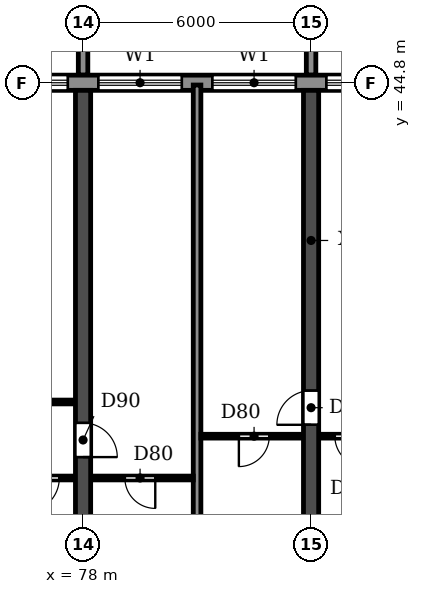
"""IFC4 building model, lengths in metres.
Left out: names, types, materials, properties, quantities, classifications, styles, units other than length and angle.
Written with IfcOpenShell. Run it as: python <this file> out.ifc"""

import sys

from ifc_helpers import new_model, si_unit, direction, frame, frame_2d, origin, place, context, subcontext, project, spatial, polyline, rectangle, outline, extrude, source, transform, mapped, element, fill, save


model = new_model("IFC4")
c1 = context("Model", 3, precision=1e-05, world=origin(), true_north=direction((0.0, 1.0)))
c2 = subcontext(c1, "Body", "Model", "MODEL_VIEW")
j1 = project(units=[si_unit("LENGTHUNIT", "METRE"), si_unit("PLANEANGLEUNIT", "RADIAN")], contexts=[c1])
p1 = place(None, origin())
s1 = spatial("IfcSite", under=j1, at=p1, CompositionType="ELEMENT")
p2 = place(p1, origin())
s2 = spatial("IfcBuilding", under=s1, at=p2, CompositionType="ELEMENT")
p3 = place(p2, frame((0.0, 0.0, 49.8)))
s3 = spatial("IfcBuildingStorey", under=s2, at=p3, CompositionType="ELEMENT", Elevation=49.8)
p4 = place(p3, frame((78.0, 30.55, 0.0), z_axis=(0.0, 0.0, 1.0), x_axis=(0.0, 1.0, 0.0)))
e1 = element("IfcWall", 1, at=p4, inside=s3, PredefinedType="SHEAR", context=c2, shape_type="SweptSolid", body=[
    extrude(rectangle(XDim=14.05, YDim=0.4, at=frame_2d((7.025, 0.0))), origin(), (0.0, 0.0, 1.0), 3.0),
])
p5 = place(p4, frame((4.4, 0.0, 0.0)))
e2 = element("IfcOpeningElement", 2, at=p5, cuts=e1, PredefinedType="OPENING", context=c2, shape_type="SweptSolid", body=[
    extrude(rectangle(XDim=0.9, YDim=2.1, at=frame_2d((0.45, 1.05))), frame((0.0, 0.21, 0.0), z_axis=(0.0, -1.0, 0.0), x_axis=(1.0, 0.0, 0.0)), (0.0, 0.0, 1.0), 0.42),
])
p6 = place(p3, frame((84.0, 30.55, 0.0), z_axis=(0.0, 0.0, 1.0), x_axis=(0.0, 1.0, 0.0)))
e3 = element("IfcWall", 3, at=p6, inside=s3, PredefinedType="SHEAR", context=c2, shape_type="SweptSolid", body=[
    extrude(rectangle(XDim=14.05, YDim=0.4, at=frame_2d((7.025, 0.0))), origin(), (0.0, 0.0, 1.0), 3.0),
])
p7 = place(p6, frame((5.25, 0.0, 0.0)))
e4 = element("IfcOpeningElement", 4, at=p7, cuts=e3, PredefinedType="OPENING", context=c2, shape_type="SweptSolid", body=[
    extrude(rectangle(XDim=0.9, YDim=2.1, at=frame_2d((0.45, 1.05))), frame((0.0, 0.21, 0.0), z_axis=(0.0, -1.0, 0.0), x_axis=(1.0, 0.0, 0.0)), (0.0, 0.0, 1.0), 0.42),
])
p8 = place(p3, frame((97.317, 44.8, 0.0), z_axis=(0.0, 0.0, 1.0), x_axis=(-1.0, 0.0, 0.0)))
e5 = element("IfcWall", 5, at=p8, inside=s3, PredefinedType="STANDARD", context=c2, shape_type="SweptSolid", body=[
    extrude(rectangle(XDim=92.634, YDim=0.4, at=frame_2d((46.317, 0.0))), origin(), (0.0, 0.0, 1.0), 3.0),
])
p9 = place(p8, frame((88.917, 0.0, 0.0)))
e6 = element("IfcOpeningElement", 6, at=p9, cuts=e5, PredefinedType="OPENING", context=c2, shape_type="SweptSolid", body=[
    extrude(rectangle(XDim=1.8, YDim=2.4, at=frame_2d((0.9, 1.2))), frame((0.0, 0.21, 0.0), z_axis=(0.0, -1.0, 0.0), x_axis=(1.0, 0.0, 0.0)), (0.0, 0.0, 1.0), 0.42),
])
p10 = place(p8, frame((85.717, 0.0, 0.9)))
e7 = element("IfcOpeningElement", 7, at=p10, cuts=e5, PredefinedType="OPENING", context=c2, shape_type="SweptSolid", body=[
    extrude(rectangle(XDim=2.2, YDim=1.5, at=frame_2d((1.1, 0.75))), frame((0.0, 0.21, 0.0), z_axis=(0.0, -1.0, 0.0), x_axis=(1.0, 0.0, 0.0)), (0.0, 0.0, 1.0), 0.42),
])
p11 = place(p8, frame((82.717, 0.0, 0.9)))
e8 = element("IfcOpeningElement", 8, at=p11, cuts=e5, PredefinedType="OPENING", context=c2, shape_type="SweptSolid", body=[
    extrude(rectangle(XDim=2.2, YDim=1.5, at=frame_2d((1.1, 0.75))), frame((0.0, 0.21, 0.0), z_axis=(0.0, -1.0, 0.0), x_axis=(1.0, 0.0, 0.0)), (0.0, 0.0, 1.0), 0.42),
])
p12 = place(p8, frame((79.717, 0.0, 0.9)))
e9 = element("IfcOpeningElement", 9, at=p12, cuts=e5, PredefinedType="OPENING", context=c2, shape_type="SweptSolid", body=[
    extrude(rectangle(XDim=2.2, YDim=1.5, at=frame_2d((1.1, 0.75))), frame((0.0, 0.21, 0.0), z_axis=(0.0, -1.0, 0.0), x_axis=(1.0, 0.0, 0.0)), (0.0, 0.0, 1.0), 0.42),
])
p13 = place(p8, frame((76.717, 0.0, 0.9)))
e10 = element("IfcOpeningElement", 10, at=p13, cuts=e5, PredefinedType="OPENING", context=c2, shape_type="SweptSolid", body=[
    extrude(rectangle(XDim=2.2, YDim=1.5, at=frame_2d((1.1, 0.75))), frame((0.0, 0.21, 0.0), z_axis=(0.0, -1.0, 0.0), x_axis=(1.0, 0.0, 0.0)), (0.0, 0.0, 1.0), 0.42),
])
p14 = place(p8, frame((73.917, 0.0, 0.0)))
e11 = element("IfcOpeningElement", 11, at=p14, cuts=e5, PredefinedType="OPENING", context=c2, shape_type="SweptSolid", body=[
    extrude(rectangle(XDim=1.8, YDim=2.4, at=frame_2d((0.9, 1.2))), frame((0.0, 0.21, 0.0), z_axis=(0.0, -1.0, 0.0), x_axis=(1.0, 0.0, 0.0)), (0.0, 0.0, 1.0), 0.42),
])
p15 = place(p8, frame((70.717, 0.0, 0.9)))
e12 = element("IfcOpeningElement", 12, at=p15, cuts=e5, PredefinedType="OPENING", context=c2, shape_type="SweptSolid", body=[
    extrude(rectangle(XDim=2.2, YDim=1.5, at=frame_2d((1.1, 0.75))), frame((0.0, 0.21, 0.0), z_axis=(0.0, -1.0, 0.0), x_axis=(1.0, 0.0, 0.0)), (0.0, 0.0, 1.0), 0.42),
])
p16 = place(p8, frame((67.717, 0.0, 0.9)))
e13 = element("IfcOpeningElement", 13, at=p16, cuts=e5, PredefinedType="OPENING", context=c2, shape_type="SweptSolid", body=[
    extrude(rectangle(XDim=2.2, YDim=1.5, at=frame_2d((1.1, 0.75))), frame((0.0, 0.21, 0.0), z_axis=(0.0, -1.0, 0.0), x_axis=(1.0, 0.0, 0.0)), (0.0, 0.0, 1.0), 0.42),
])
p17 = place(p8, frame((64.717, 0.0, 0.9)))
e14 = element("IfcOpeningElement", 14, at=p17, cuts=e5, PredefinedType="OPENING", context=c2, shape_type="SweptSolid", body=[
    extrude(rectangle(XDim=2.2, YDim=1.5, at=frame_2d((1.1, 0.75))), frame((0.0, 0.21, 0.0), z_axis=(0.0, -1.0, 0.0), x_axis=(1.0, 0.0, 0.0)), (0.0, 0.0, 1.0), 0.42),
])
p18 = place(p8, frame((61.917, 0.0, 0.0)))
e15 = element("IfcOpeningElement", 15, at=p18, cuts=e5, PredefinedType="OPENING", context=c2, shape_type="SweptSolid", body=[
    extrude(rectangle(XDim=1.8, YDim=2.4, at=frame_2d((0.9, 1.2))), frame((0.0, 0.21, 0.0), z_axis=(0.0, -1.0, 0.0), x_axis=(1.0, 0.0, 0.0)), (0.0, 0.0, 1.0), 0.42),
])
p19 = place(p8, frame((58.717, 0.0, 0.9)))
e16 = element("IfcOpeningElement", 16, at=p19, cuts=e5, PredefinedType="OPENING", context=c2, shape_type="SweptSolid", body=[
    extrude(rectangle(XDim=2.2, YDim=1.5, at=frame_2d((1.1, 0.75))), frame((0.0, 0.21, 0.0), z_axis=(0.0, -1.0, 0.0), x_axis=(1.0, 0.0, 0.0)), (0.0, 0.0, 1.0), 0.42),
])
p20 = place(p8, frame((55.717, 0.0, 0.9)))
e17 = element("IfcOpeningElement", 17, at=p20, cuts=e5, PredefinedType="OPENING", context=c2, shape_type="SweptSolid", body=[
    extrude(rectangle(XDim=2.2, YDim=1.5, at=frame_2d((1.1, 0.75))), frame((0.0, 0.21, 0.0), z_axis=(0.0, -1.0, 0.0), x_axis=(1.0, 0.0, 0.0)), (0.0, 0.0, 1.0), 0.42),
])
p21 = place(p8, frame((52.717, 0.0, 0.9)))
e18 = element("IfcOpeningElement", 18, at=p21, cuts=e5, PredefinedType="OPENING", context=c2, shape_type="SweptSolid", body=[
    extrude(rectangle(XDim=2.2, YDim=1.5, at=frame_2d((1.1, 0.75))), frame((0.0, 0.21, 0.0), z_axis=(0.0, -1.0, 0.0), x_axis=(1.0, 0.0, 0.0)), (0.0, 0.0, 1.0), 0.42),
])
p22 = place(p8, frame((49.917, 0.0, 0.0)))
e19 = element("IfcOpeningElement", 19, at=p22, cuts=e5, PredefinedType="OPENING", context=c2, shape_type="SweptSolid", body=[
    extrude(rectangle(XDim=1.8, YDim=2.4, at=frame_2d((0.9, 1.2))), frame((0.0, 0.21, 0.0), z_axis=(0.0, -1.0, 0.0), x_axis=(1.0, 0.0, 0.0)), (0.0, 0.0, 1.0), 0.42),
])
p23 = place(p8, frame((46.717, 0.0, 0.9)))
e20 = element("IfcOpeningElement", 20, at=p23, cuts=e5, PredefinedType="OPENING", context=c2, shape_type="SweptSolid", body=[
    extrude(rectangle(XDim=2.2, YDim=1.5, at=frame_2d((1.1, 0.75))), frame((0.0, 0.21, 0.0), z_axis=(0.0, -1.0, 0.0), x_axis=(1.0, 0.0, 0.0)), (0.0, 0.0, 1.0), 0.42),
])
p24 = place(p8, frame((43.717, 0.0, 0.9)))
e21 = element("IfcOpeningElement", 21, at=p24, cuts=e5, PredefinedType="OPENING", context=c2, shape_type="SweptSolid", body=[
    extrude(rectangle(XDim=2.2, YDim=1.5, at=frame_2d((1.1, 0.75))), frame((0.0, 0.21, 0.0), z_axis=(0.0, -1.0, 0.0), x_axis=(1.0, 0.0, 0.0)), (0.0, 0.0, 1.0), 0.42),
])
p25 = place(p8, frame((40.717, 0.0, 0.9)))
e22 = element("IfcOpeningElement", 22, at=p25, cuts=e5, PredefinedType="OPENING", context=c2, shape_type="SweptSolid", body=[
    extrude(rectangle(XDim=2.2, YDim=1.5, at=frame_2d((1.1, 0.75))), frame((0.0, 0.21, 0.0), z_axis=(0.0, -1.0, 0.0), x_axis=(1.0, 0.0, 0.0)), (0.0, 0.0, 1.0), 0.42),
])
p26 = place(p8, frame((37.917, 0.0, 0.0)))
e23 = element("IfcOpeningElement", 23, at=p26, cuts=e5, PredefinedType="OPENING", context=c2, shape_type="SweptSolid", body=[
    extrude(rectangle(XDim=1.8, YDim=2.4, at=frame_2d((0.9, 1.2))), frame((0.0, 0.21, 0.0), z_axis=(0.0, -1.0, 0.0), x_axis=(1.0, 0.0, 0.0)), (0.0, 0.0, 1.0), 0.42),
])
p27 = place(p8, frame((34.717, 0.0, 0.9)))
e24 = element("IfcOpeningElement", 24, at=p27, cuts=e5, PredefinedType="OPENING", context=c2, shape_type="SweptSolid", body=[
    extrude(rectangle(XDim=2.2, YDim=1.5, at=frame_2d((1.1, 0.75))), frame((0.0, 0.21, 0.0), z_axis=(0.0, -1.0, 0.0), x_axis=(1.0, 0.0, 0.0)), (0.0, 0.0, 1.0), 0.42),
])
p28 = place(p8, frame((31.717, 0.0, 0.9)))
e25 = element("IfcOpeningElement", 25, at=p28, cuts=e5, PredefinedType="OPENING", context=c2, shape_type="SweptSolid", body=[
    extrude(rectangle(XDim=2.2, YDim=1.5, at=frame_2d((1.1, 0.75))), frame((0.0, 0.21, 0.0), z_axis=(0.0, -1.0, 0.0), x_axis=(1.0, 0.0, 0.0)), (0.0, 0.0, 1.0), 0.42),
])
p29 = place(p8, frame((28.717, 0.0, 0.9)))
e26 = element("IfcOpeningElement", 26, at=p29, cuts=e5, PredefinedType="OPENING", context=c2, shape_type="SweptSolid", body=[
    extrude(rectangle(XDim=2.2, YDim=1.5, at=frame_2d((1.1, 0.75))), frame((0.0, 0.21, 0.0), z_axis=(0.0, -1.0, 0.0), x_axis=(1.0, 0.0, 0.0)), (0.0, 0.0, 1.0), 0.42),
])
p30 = place(p8, frame((25.917, 0.0, 0.0)))
e27 = element("IfcOpeningElement", 27, at=p30, cuts=e5, PredefinedType="OPENING", context=c2, shape_type="SweptSolid", body=[
    extrude(rectangle(XDim=1.8, YDim=2.4, at=frame_2d((0.9, 1.2))), frame((0.0, 0.21, 0.0), z_axis=(0.0, -1.0, 0.0), x_axis=(1.0, 0.0, 0.0)), (0.0, 0.0, 1.0), 0.42),
])
p31 = place(p8, frame((22.917, 0.0, 0.0)))
e28 = element("IfcOpeningElement", 28, at=p31, cuts=e5, PredefinedType="OPENING", context=c2, shape_type="SweptSolid", body=[
    extrude(rectangle(XDim=1.8, YDim=2.4, at=frame_2d((0.9, 1.2))), frame((0.0, 0.21, 0.0), z_axis=(0.0, -1.0, 0.0), x_axis=(1.0, 0.0, 0.0)), (0.0, 0.0, 1.0), 0.42),
])
p32 = place(p8, frame((19.717, 0.0, 0.9)))
e29 = element("IfcOpeningElement", 29, at=p32, cuts=e5, PredefinedType="OPENING", context=c2, shape_type="SweptSolid", body=[
    extrude(rectangle(XDim=2.2, YDim=1.5, at=frame_2d((1.1, 0.75))), frame((0.0, 0.21, 0.0), z_axis=(0.0, -1.0, 0.0), x_axis=(1.0, 0.0, 0.0)), (0.0, 0.0, 1.0), 0.42),
])
p33 = place(p8, frame((16.717, 0.0, 0.9)))
e30 = element("IfcOpeningElement", 30, at=p33, cuts=e5, PredefinedType="OPENING", context=c2, shape_type="SweptSolid", body=[
    extrude(rectangle(XDim=2.2, YDim=1.5, at=frame_2d((1.1, 0.75))), frame((0.0, 0.21, 0.0), z_axis=(0.0, -1.0, 0.0), x_axis=(1.0, 0.0, 0.0)), (0.0, 0.0, 1.0), 0.42),
])
p34 = place(p8, frame((13.717, 0.0, 0.9)))
e31 = element("IfcOpeningElement", 31, at=p34, cuts=e5, PredefinedType="OPENING", context=c2, shape_type="SweptSolid", body=[
    extrude(rectangle(XDim=2.2, YDim=1.5, at=frame_2d((1.1, 0.75))), frame((0.0, 0.21, 0.0), z_axis=(0.0, -1.0, 0.0), x_axis=(1.0, 0.0, 0.0)), (0.0, 0.0, 1.0), 0.42),
])
p35 = place(p8, frame((10.717, 0.0, 0.9)))
e32 = element("IfcOpeningElement", 32, at=p35, cuts=e5, PredefinedType="OPENING", context=c2, shape_type="SweptSolid", body=[
    extrude(rectangle(XDim=2.2, YDim=1.5, at=frame_2d((1.1, 0.75))), frame((0.0, 0.21, 0.0), z_axis=(0.0, -1.0, 0.0), x_axis=(1.0, 0.0, 0.0)), (0.0, 0.0, 1.0), 0.42),
])
p36 = place(p8, frame((7.917, 0.0, 0.0)))
e33 = element("IfcOpeningElement", 33, at=p36, cuts=e5, PredefinedType="OPENING", context=c2, shape_type="SweptSolid", body=[
    extrude(rectangle(XDim=1.8, YDim=2.4, at=frame_2d((0.9, 1.2))), frame((0.0, 0.21, 0.0), z_axis=(0.0, -1.0, 0.0), x_axis=(1.0, 0.0, 0.0)), (0.0, 0.0, 1.0), 0.42),
])
p37 = place(p8, frame((4.717, 0.0, 0.9)))
e34 = element("IfcOpeningElement", 34, at=p37, cuts=e5, PredefinedType="OPENING", context=c2, shape_type="SweptSolid", body=[
    extrude(rectangle(XDim=2.2, YDim=1.5, at=frame_2d((1.1, 0.75))), frame((0.0, 0.21, 0.0), z_axis=(0.0, -1.0, 0.0), x_axis=(1.0, 0.0, 0.0)), (0.0, 0.0, 1.0), 0.42),
])
p38 = place(p8, frame((1.917, 0.0, 0.0)))
e35 = element("IfcOpeningElement", 35, at=p38, cuts=e5, PredefinedType="OPENING", context=c2, shape_type="SweptSolid", body=[
    extrude(rectangle(XDim=1.8, YDim=2.4, at=frame_2d((0.9, 1.2))), frame((0.0, 0.21, 0.0), z_axis=(0.0, -1.0, 0.0), x_axis=(1.0, 0.0, 0.0)), (0.0, 0.0, 1.0), 0.42),
])
m1 = source(origin(), c2, "Body", "SweptSolid", [
    extrude(outline(polyline([(0.0, 0.0), (0.25, 0.0), (0.25, 3.1), (0.0, 3.1), (0.0, 0.0)])), origin(), (0.0, 0.0, 1.0), 3.1),
])
for number, where in (
    (36, (77.875, 45.0, 0.0)),
    (37, (83.875, 45.0, 0.0)),
):
    element("IfcWall", number, at=place(p3, frame(where)), inside=s3, PredefinedType="STANDARD", context=c2, shape_type="MappedRepresentation", body=[
        mapped(m1, transform((0.0, 0.0, 0.0))),
    ])
p39 = place(p3, frame((81.0, 30.56, 0.0), z_axis=(0.0, 0.0, 1.0), x_axis=(0.0, 1.0, 0.0)))
e38 = element("IfcWall", 38, at=p39, inside=s3, PredefinedType="PARTITIONING", context=c2, shape_type="SweptSolid", body=[
    extrude(rectangle(XDim=14.18, YDim=0.2, at=frame_2d((7.09, 0.0))), origin(), (0.0, 0.0, 1.0), 3.0),
])
p40 = place(p3, frame((75.8, 34.4, 0.0), z_axis=(0.0, 0.0, 1.0), x_axis=(1.0, 0.0, 0.0)))
e39 = element("IfcWall", 39, at=p40, inside=s3, PredefinedType="PARTITIONING", context=c2, shape_type="SweptSolid", body=[
    extrude(rectangle(XDim=1.99, YDim=0.1, at=frame_2d((0.995, 0.0))), origin(), (0.0, 0.0, 1.0), 3.0),
])
p41 = place(p40, frame((0.675, 0.0, 0.0)))
e40 = element("IfcOpeningElement", 40, at=p41, cuts=e39, PredefinedType="OPENING", context=c2, shape_type="SweptSolid", body=[
    extrude(rectangle(XDim=0.9, YDim=2.1, at=frame_2d((0.45, 1.05))), frame((0.0, 0.06, 0.0), z_axis=(0.0, -1.0, 0.0), x_axis=(1.0, 0.0, 0.0)), (0.0, 0.0, 1.0), 0.12),
])
p42 = place(p3, frame((78.21, 34.4, 0.0), z_axis=(0.0, 0.0, 1.0), x_axis=(1.0, 0.0, 0.0)))
e41 = element("IfcWall", 41, at=p42, inside=s3, PredefinedType="PARTITIONING", context=c2, shape_type="SweptSolid", body=[
    extrude(rectangle(XDim=2.69, YDim=0.1, at=frame_2d((1.345, 0.0))), origin(), (0.0, 0.0, 1.0), 3.0),
])
p43 = place(p42, frame((0.89, 0.0, 0.0)))
e42 = element("IfcOpeningElement", 42, at=p43, cuts=e41, PredefinedType="OPENING", context=c2, shape_type="SweptSolid", body=[
    extrude(rectangle(XDim=0.8, YDim=2.1, at=frame_2d((0.4, 1.05))), frame((0.0, 0.06, 0.0), z_axis=(0.0, -1.0, 0.0), x_axis=(1.0, 0.0, 0.0)), (0.0, 0.0, 1.0), 0.12),
])
p44 = place(p3, frame((81.1, 35.5, 0.0), z_axis=(0.0, 0.0, 1.0), x_axis=(1.0, 0.0, 0.0)))
e43 = element("IfcWall", 43, at=p44, inside=s3, PredefinedType="PARTITIONING", context=c2, shape_type="SweptSolid", body=[
    extrude(rectangle(XDim=2.69, YDim=0.1, at=frame_2d((1.345, 0.0))), origin(), (0.0, 0.0, 1.0), 3.0),
])
p45 = place(p44, frame((1.0, 0.0, 0.0)))
e44 = element("IfcOpeningElement", 44, at=p45, cuts=e43, PredefinedType="OPENING", context=c2, shape_type="SweptSolid", body=[
    extrude(rectangle(XDim=0.8, YDim=2.1, at=frame_2d((0.4, 1.05))), frame((0.0, 0.06, 0.0), z_axis=(0.0, -1.0, 0.0), x_axis=(1.0, 0.0, 0.0)), (0.0, 0.0, 1.0), 0.12),
])
p46 = place(p3, frame((84.21, 35.5, 0.0), z_axis=(0.0, 0.0, 1.0), x_axis=(1.0, 0.0, 0.0)))
e45 = element("IfcWall", 45, at=p46, inside=s3, PredefinedType="PARTITIONING", context=c2, shape_type="SweptSolid", body=[
    extrude(rectangle(XDim=1.89, YDim=0.1, at=frame_2d((0.945, 0.0))), origin(), (0.0, 0.0, 1.0), 3.0),
])
p47 = place(p46, frame((0.415, 0.0, 0.0)))
e46 = element("IfcOpeningElement", 46, at=p47, cuts=e45, PredefinedType="OPENING", context=c2, shape_type="SweptSolid", body=[
    extrude(rectangle(XDim=0.8, YDim=2.1, at=frame_2d((0.4, 1.05))), frame((0.0, 0.06, 0.0), z_axis=(0.0, -1.0, 0.0), x_axis=(1.0, 0.0, 0.0)), (0.0, 0.0, 1.0), 0.12),
])
p48 = place(p3, frame((74.95, 36.4, 0.0), z_axis=(0.0, 0.0, 1.0), x_axis=(1.0, 0.0, 0.0)))
e47 = element("IfcWall", 47, at=p48, inside=s3, PredefinedType="PARTITIONING", context=c2, shape_type="SweptSolid", body=[
    extrude(rectangle(XDim=2.84, YDim=0.1, at=frame_2d((1.42, 0.0))), origin(), (0.0, 0.0, 1.0), 3.0),
])
p49 = place(p48, frame((0.55, 0.0, 0.0)))
e48 = element("IfcOpeningElement", 48, at=p49, cuts=e47, PredefinedType="OPENING", context=c2, shape_type="SweptSolid", body=[
    extrude(rectangle(XDim=0.9, YDim=2.1, at=frame_2d((0.45, 1.05))), frame((0.0, 0.06, 0.0), z_axis=(0.0, -1.0, 0.0), x_axis=(1.0, 0.0, 0.0)), (0.0, 0.0, 1.0), 0.12),
])
p50 = place(p32, origin())
e49 = element("IfcWindow", 49, at=p50, inside=s3, PartitioningType="DOUBLE_PANEL_HORIZONTAL", PredefinedType="WINDOW", context=c2, shape_type="SweptSolid", body=[
    extrude(rectangle(XDim=2.2, YDim=1.5, at=frame_2d((1.1, 0.75))), frame((0.0, 0.03, 0.0), z_axis=(0.0, -1.0, 0.0), x_axis=(1.0, 0.0, 0.0)), (0.0, 0.0, 1.0), 0.06),
])
fill(e29, e49)
p51 = place(p33, origin())
e50 = element("IfcWindow", 50, at=p51, inside=s3, PartitioningType="DOUBLE_PANEL_HORIZONTAL", PredefinedType="WINDOW", context=c2, shape_type="SweptSolid", body=[
    extrude(rectangle(XDim=2.2, YDim=1.5, at=frame_2d((1.1, 0.75))), frame((0.0, 0.03, 0.0), z_axis=(0.0, -1.0, 0.0), x_axis=(1.0, 0.0, 0.0)), (0.0, 0.0, 1.0), 0.06),
])
fill(e30, e50)
p52 = place(p34, origin())
e51 = element("IfcWindow", 51, at=p52, inside=s3, PartitioningType="DOUBLE_PANEL_HORIZONTAL", PredefinedType="WINDOW", context=c2, shape_type="SweptSolid", body=[
    extrude(rectangle(XDim=2.2, YDim=1.5, at=frame_2d((1.1, 0.75))), frame((0.0, 0.03, 0.0), z_axis=(0.0, -1.0, 0.0), x_axis=(1.0, 0.0, 0.0)), (0.0, 0.0, 1.0), 0.06),
])
fill(e31, e51)
p53 = place(p35, origin())
e52 = element("IfcWindow", 52, at=p53, inside=s3, PartitioningType="DOUBLE_PANEL_HORIZONTAL", PredefinedType="WINDOW", context=c2, shape_type="SweptSolid", body=[
    extrude(rectangle(XDim=2.2, YDim=1.5, at=frame_2d((1.1, 0.75))), frame((0.0, 0.03, 0.0), z_axis=(0.0, -1.0, 0.0), x_axis=(1.0, 0.0, 0.0)), (0.0, 0.0, 1.0), 0.06),
])
fill(e32, e52)
p54 = place(p43, frame((0.8, 0.0, 0.0), z_axis=(0.0, 0.0, 1.0), x_axis=(-1.0, 0.0, 0.0)))
e53 = element("IfcDoor", 53, at=p54, inside=s3, OperationType="SINGLE_SWING_LEFT", PredefinedType="DOOR", context=c2, shape_type="SweptSolid", body=[
    extrude(rectangle(XDim=0.8, YDim=2.1, at=frame_2d((0.4, 1.05))), frame((0.0, 0.025, 0.0), z_axis=(0.0, -1.0, 0.0), x_axis=(1.0, 0.0, 0.0)), (0.0, 0.0, 1.0), 0.05),
])
fill(e42, e53)
p55 = place(p41, frame((0.9, 0.0, 0.0), z_axis=(0.0, 0.0, 1.0), x_axis=(-1.0, 0.0, 0.0)))
e54 = element("IfcDoor", 54, at=p55, inside=s3, OperationType="SINGLE_SWING_RIGHT", PredefinedType="DOOR", context=c2, shape_type="SweptSolid", body=[
    extrude(rectangle(XDim=0.9, YDim=2.1, at=frame_2d((0.45, 1.05))), frame((0.0, 0.025, 0.0), z_axis=(0.0, -1.0, 0.0), x_axis=(1.0, 0.0, 0.0)), (0.0, 0.0, 1.0), 0.05),
])
fill(e40, e54)
p56 = place(p5, frame((0.9, 0.0, 0.0), z_axis=(0.0, 0.0, 1.0), x_axis=(-1.0, 0.0, 0.0)))
e55 = element("IfcDoor", 55, at=p56, inside=s3, OperationType="SINGLE_SWING_RIGHT", PredefinedType="DOOR", context=c2, shape_type="SweptSolid", body=[
    extrude(rectangle(XDim=0.9, YDim=2.1, at=frame_2d((0.45, 1.05))), frame((0.0, 0.025, 0.0), z_axis=(0.0, -1.0, 0.0), x_axis=(1.0, 0.0, 0.0)), (0.0, 0.0, 1.0), 0.05),
])
fill(e2, e55)
p57 = place(p45, frame((0.8, 0.0, 0.0), z_axis=(0.0, 0.0, 1.0), x_axis=(-1.0, 0.0, 0.0)))
e56 = element("IfcDoor", 56, at=p57, inside=s3, OperationType="SINGLE_SWING_RIGHT", PredefinedType="DOOR", context=c2, shape_type="SweptSolid", body=[
    extrude(rectangle(XDim=0.8, YDim=2.1, at=frame_2d((0.4, 1.05))), frame((0.0, 0.025, 0.0), z_axis=(0.0, -1.0, 0.0), x_axis=(1.0, 0.0, 0.0)), (0.0, 0.0, 1.0), 0.05),
])
fill(e44, e56)
p58 = place(p7, origin())
e57 = element("IfcDoor", 57, at=p58, inside=s3, OperationType="SINGLE_SWING_LEFT", PredefinedType="DOOR", context=c2, shape_type="SweptSolid", body=[
    extrude(rectangle(XDim=0.9, YDim=2.1, at=frame_2d((0.45, 1.05))), frame((0.0, 0.025, 0.0), z_axis=(0.0, -1.0, 0.0), x_axis=(1.0, 0.0, 0.0)), (0.0, 0.0, 1.0), 0.05),
])
fill(e4, e57)
p59 = place(p47, frame((0.8, 0.0, 0.0), z_axis=(0.0, 0.0, 1.0), x_axis=(-1.0, 0.0, 0.0)))
e58 = element("IfcDoor", 58, at=p59, inside=s3, OperationType="SINGLE_SWING_LEFT", PredefinedType="DOOR", context=c2, shape_type="SweptSolid", body=[
    extrude(rectangle(XDim=0.8, YDim=2.1, at=frame_2d((0.4, 1.05))), frame((0.0, 0.025, 0.0), z_axis=(0.0, -1.0, 0.0), x_axis=(1.0, 0.0, 0.0)), (0.0, 0.0, 1.0), 0.05),
])
fill(e46, e58)
save(model, sys.argv[1])
